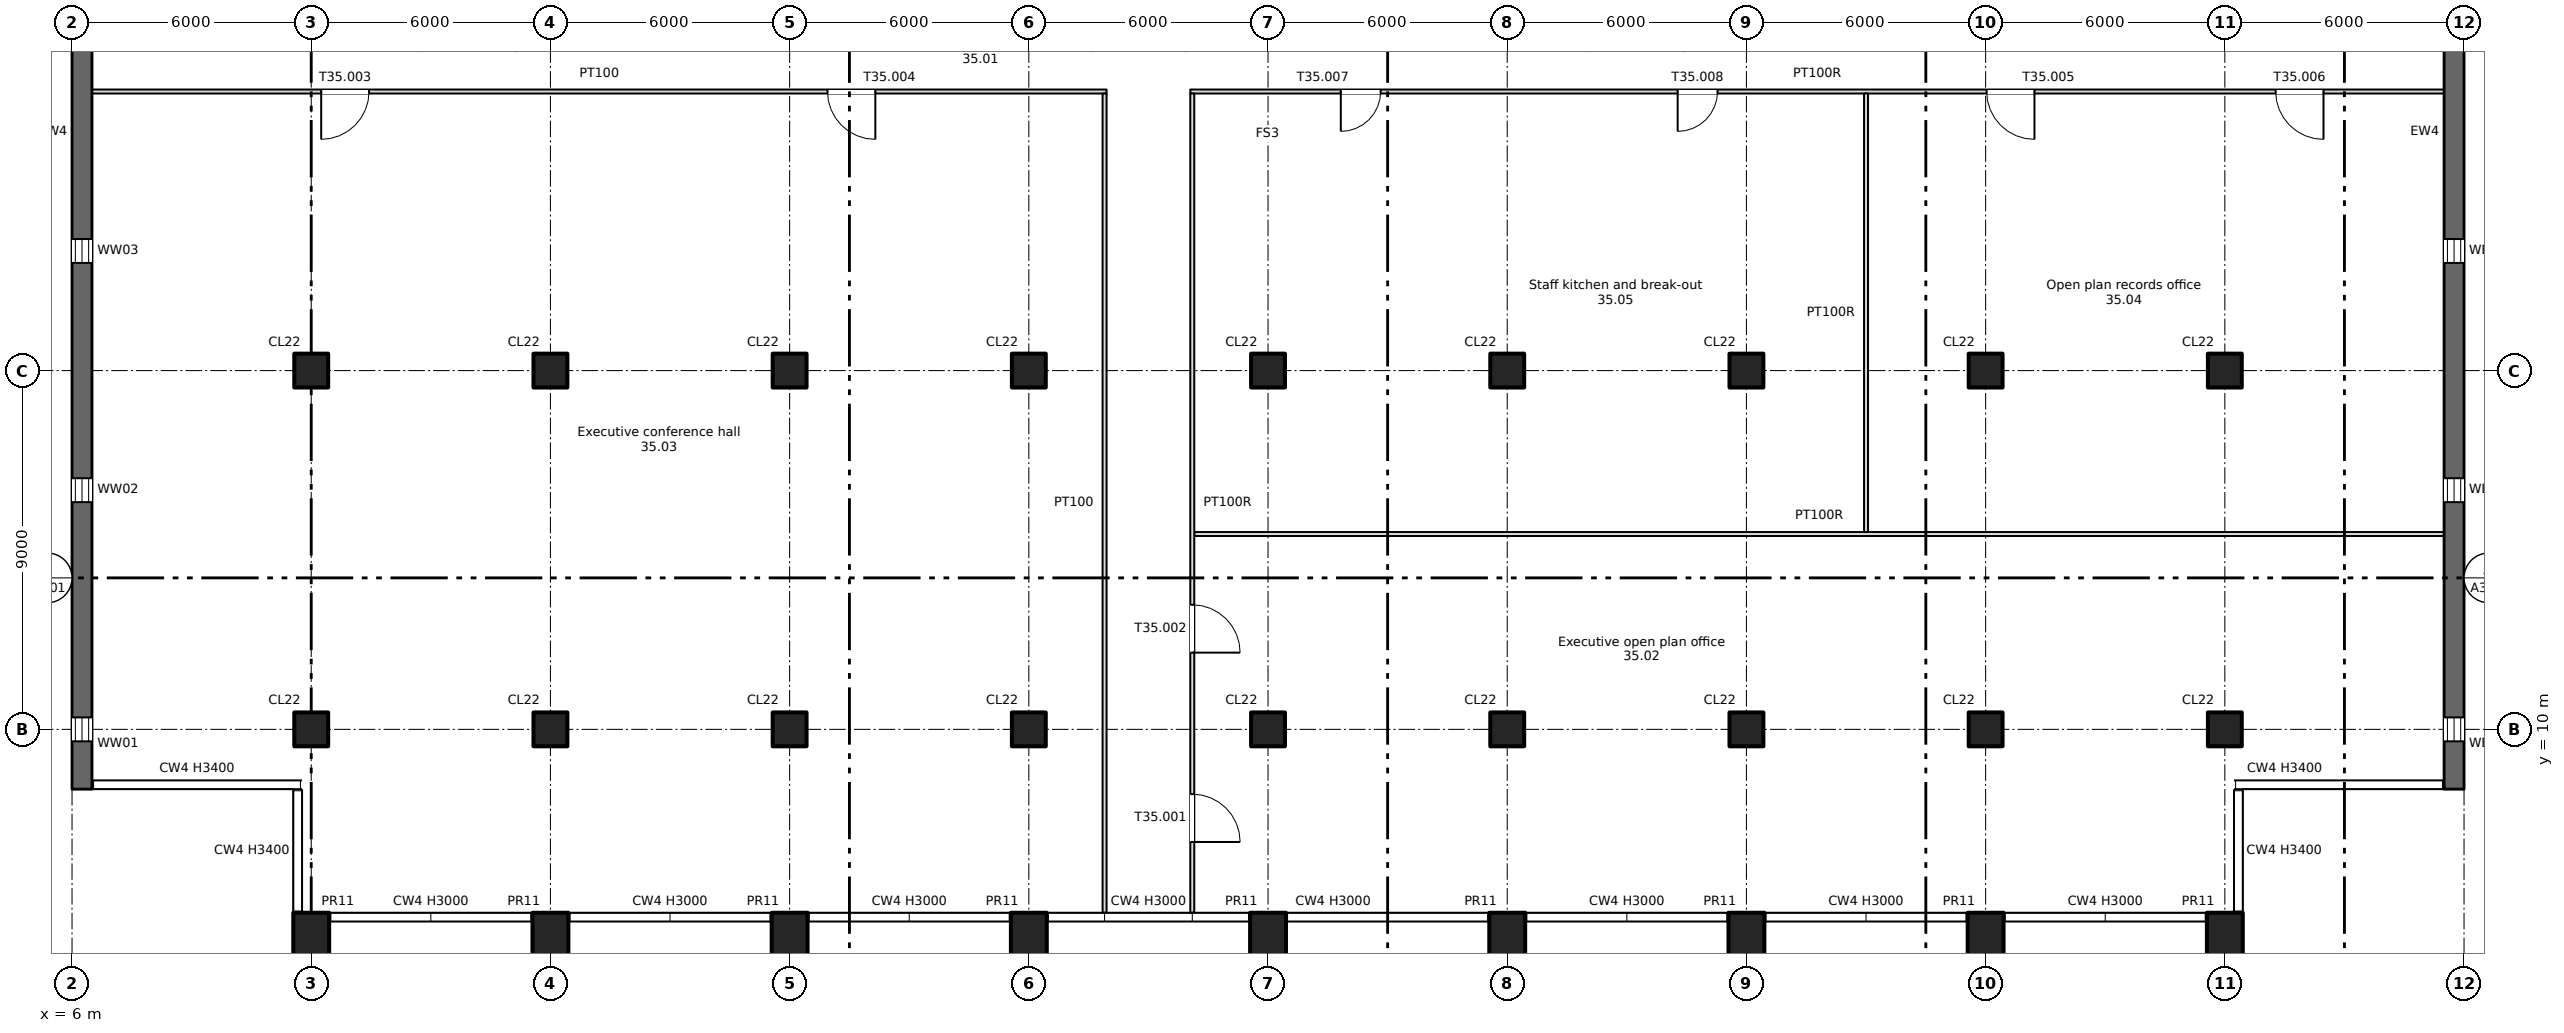
"""IFC4 building model, lengths in metres.
Left out: names, types, materials, properties, quantities, classifications, styles, units other than length and angle.
Written with IfcOpenShell. Run it as: python <this file> out.ifc"""

import sys

from ifc_helpers import new_model, si_unit, direction, frame, frame_2d, origin, origin_2d, place, context, subcontext, project, spatial, rectangle, extrude, element, fill, save


model = new_model("IFC4")
c1 = context("Model", 3, precision=1e-05, world=origin(), true_north=direction((0.0, 1.0)))
c2 = subcontext(c1, "Body", "Model", "MODEL_VIEW")
j1 = project(units=[si_unit("LENGTHUNIT", "METRE"), si_unit("PLANEANGLEUNIT", "RADIAN")], contexts=[c1])
p1 = place(None, origin())
s1 = spatial("IfcSite", under=j1, at=p1, CompositionType="ELEMENT")
p2 = place(p1, origin())
s2 = spatial("IfcBuilding", under=s1, at=p2, CompositionType="ELEMENT")
p3 = place(p2, frame((0.0, 0.0, 246.95)))
s3 = spatial("IfcBuildingStorey", under=s2, at=p3, CompositionType="ELEMENT", Elevation=246.95)
for number, where, z_axis, x_axis in (
    (1, (12.0, 4.7, -0.4), (0.0, 0.0, 1.0), (1.0, 0.0, 0.0)),
    (2, (18.0, 4.7, -0.4), (0.0, 0.0, 1.0), (1.0, 0.0, 0.0)),
    (3, (24.0, 4.7, -0.4), (0.0, 0.0, 1.0), (1.0, 0.0, 0.0)),
    (4, (30.0, 4.7, -0.4), (0.0, 0.0, 1.0), (1.0, 0.0, 0.0)),
    (5, (36.0, 4.7, -0.4), (0.0, 0.0, 1.0), (1.0, 0.0, 0.0)),
    (6, (42.0, 4.7, -0.4), (0.0, 0.0, 1.0), (1.0, 0.0, 0.0)),
    (7, (48.0, 4.7, -0.4), (0.0, 0.0, 1.0), (1.0, 0.0, 0.0)),
    (8, (54.0, 4.7, -0.4), (0.0, 0.0, 1.0), (1.0, 0.0, 0.0)),
    (9, (60.0, 4.7, -0.4), (0.0, 0.0, 1.0), (1.0, 0.0, 0.0)),
):
    element("IfcColumn", number, at=place(p3, frame(where, z_axis=z_axis, x_axis=x_axis)), inside=s3, PredefinedType="COLUMN", context=c2, shape_type="SweptSolid", body=[
        extrude(rectangle(XDim=0.9, YDim=1.4, at=origin_2d()), origin(), (0.0, 0.0, 1.0), 3.8),
    ])
for number, where, z_axis, x_axis in (
    (10, (12.0, 10.0, 0.0), (0.0, 0.0, 1.0), (1.0, 0.0, 0.0)),
    (11, (12.0, 19.0, 0.0), (0.0, 0.0, 1.0), (1.0, 0.0, 0.0)),
    (12, (18.0, 10.0, 0.0), (0.0, 0.0, 1.0), (1.0, 0.0, 0.0)),
    (13, (18.0, 19.0, 0.0), (0.0, 0.0, 1.0), (1.0, 0.0, 0.0)),
    (14, (24.0, 10.0, 0.0), (0.0, 0.0, 1.0), (1.0, 0.0, 0.0)),
    (15, (24.0, 19.0, 0.0), (0.0, 0.0, 1.0), (1.0, 0.0, 0.0)),
    (16, (30.0, 10.0, 0.0), (0.0, 0.0, 1.0), (1.0, 0.0, 0.0)),
    (17, (30.0, 19.0, 0.0), (0.0, 0.0, 1.0), (1.0, 0.0, 0.0)),
    (18, (36.0, 10.0, 0.0), (0.0, 0.0, 1.0), (1.0, 0.0, 0.0)),
    (19, (36.0, 19.0, 0.0), (0.0, 0.0, 1.0), (1.0, 0.0, 0.0)),
    (20, (42.0, 10.0, 0.0), (0.0, 0.0, 1.0), (1.0, 0.0, 0.0)),
    (21, (42.0, 19.0, 0.0), (0.0, 0.0, 1.0), (1.0, 0.0, 0.0)),
    (22, (48.0, 10.0, 0.0), (0.0, 0.0, 1.0), (1.0, 0.0, 0.0)),
    (23, (48.0, 19.0, 0.0), (0.0, 0.0, 1.0), (1.0, 0.0, 0.0)),
    (24, (54.0, 10.0, 0.0), (0.0, 0.0, 1.0), (1.0, 0.0, 0.0)),
    (25, (54.0, 19.0, 0.0), (0.0, 0.0, 1.0), (1.0, 0.0, 0.0)),
    (26, (60.0, 10.0, 0.0), (0.0, 0.0, 1.0), (1.0, 0.0, 0.0)),
    (27, (60.0, 19.0, 0.0), (0.0, 0.0, 1.0), (1.0, 0.0, 0.0)),
):
    element("IfcColumn", number, at=place(p3, frame(where, z_axis=z_axis, x_axis=x_axis)), inside=s3, PredefinedType="COLUMN", context=c2, shape_type="SweptSolid", body=[
        extrude(rectangle(XDim=0.85, YDim=0.85, at=origin_2d()), origin(), (0.0, 0.0, 1.0), 3.4),
    ])
p4 = place(p3, frame((6.25, 8.5, 0.0), z_axis=(0.0, 0.0, 1.0), x_axis=(0.0, 1.0, 0.0)))
e28 = element("IfcWall", 28, at=p4, inside=s3, PredefinedType="SHEAR", context=c2, shape_type="SweptSolid", body=[
    extrude(rectangle(XDim=33.0, YDim=0.5, at=frame_2d((16.5, 0.0))), origin(), (0.0, 0.0, 1.0), 3.4),
])
p5 = place(p4, frame((1.2, 0.0, 0.6)))
e29 = element("IfcOpeningElement", 29, at=p5, cuts=e28, PredefinedType="OPENING", context=c2, shape_type="SweptSolid", body=[
    extrude(rectangle(XDim=0.6, YDim=2.4, at=frame_2d((0.3, 1.2))), frame((0.0, 0.26, 0.0), z_axis=(0.0, -1.0, 0.0), x_axis=(1.0, 0.0, 0.0)), (0.0, 0.0, 1.0), 0.52),
])
p6 = place(p4, frame((7.2, 0.0, 0.6)))
e30 = element("IfcOpeningElement", 30, at=p6, cuts=e28, PredefinedType="OPENING", context=c2, shape_type="SweptSolid", body=[
    extrude(rectangle(XDim=0.6, YDim=2.4, at=frame_2d((0.3, 1.2))), frame((0.0, 0.26, 0.0), z_axis=(0.0, -1.0, 0.0), x_axis=(1.0, 0.0, 0.0)), (0.0, 0.0, 1.0), 0.52),
])
p7 = place(p4, frame((13.2, 0.0, 0.6)))
e31 = element("IfcOpeningElement", 31, at=p7, cuts=e28, PredefinedType="OPENING", context=c2, shape_type="SweptSolid", body=[
    extrude(rectangle(XDim=0.6, YDim=2.4, at=frame_2d((0.3, 1.2))), frame((0.0, 0.26, 0.0), z_axis=(0.0, -1.0, 0.0), x_axis=(1.0, 0.0, 0.0)), (0.0, 0.0, 1.0), 0.52),
])
p8 = place(p3, frame((65.75, 8.5, 0.0), z_axis=(0.0, 0.0, 1.0), x_axis=(0.0, 1.0, 0.0)))
e32 = element("IfcWall", 32, at=p8, inside=s3, PredefinedType="SHEAR", context=c2, shape_type="SweptSolid", body=[
    extrude(rectangle(XDim=33.0, YDim=0.5, at=frame_2d((16.5, 0.0))), origin(), (0.0, 0.0, 1.0), 3.4),
])
p9 = place(p8, frame((1.2, 0.0, 0.6)))
e33 = element("IfcOpeningElement", 33, at=p9, cuts=e32, PredefinedType="OPENING", context=c2, shape_type="SweptSolid", body=[
    extrude(rectangle(XDim=0.6, YDim=2.4, at=frame_2d((0.3, 1.2))), frame((0.0, 0.26, 0.0), z_axis=(0.0, -1.0, 0.0), x_axis=(1.0, 0.0, 0.0)), (0.0, 0.0, 1.0), 0.52),
])
p10 = place(p8, frame((7.2, 0.0, 0.6)))
e34 = element("IfcOpeningElement", 34, at=p10, cuts=e32, PredefinedType="OPENING", context=c2, shape_type="SweptSolid", body=[
    extrude(rectangle(XDim=0.6, YDim=2.4, at=frame_2d((0.3, 1.2))), frame((0.0, 0.26, 0.0), z_axis=(0.0, -1.0, 0.0), x_axis=(1.0, 0.0, 0.0)), (0.0, 0.0, 1.0), 0.52),
])
p11 = place(p8, frame((13.2, 0.0, 0.6)))
e35 = element("IfcOpeningElement", 35, at=p11, cuts=e32, PredefinedType="OPENING", context=c2, shape_type="SweptSolid", body=[
    extrude(rectangle(XDim=0.6, YDim=2.4, at=frame_2d((0.3, 1.2))), frame((0.0, 0.26, 0.0), z_axis=(0.0, -1.0, 0.0), x_axis=(1.0, 0.0, 0.0)), (0.0, 0.0, 1.0), 0.52),
])
p12 = place(p3, frame((34.15, 14.9, 0.0), z_axis=(0.0, 0.0, 1.0), x_axis=(1.0, 0.0, 0.0)))
e36 = element("IfcWall", 36, at=p12, inside=s3, PredefinedType="PARTITIONING", context=c2, shape_type="SweptSolid", body=[
    extrude(rectangle(XDim=31.35, YDim=0.1, at=frame_2d((15.675, 0.0))), origin(), (0.0, 0.0, 1.0), 3.4),
])
p13 = place(p3, frame((6.5, 26.0, 0.0), z_axis=(0.0, 0.0, 1.0), x_axis=(1.0, 0.0, 0.0)))
e37 = element("IfcWall", 37, at=p13, inside=s3, PredefinedType="PARTITIONING", context=c2, shape_type="SweptSolid", body=[
    extrude(rectangle(XDim=25.45, YDim=0.1, at=frame_2d((12.725, 0.0))), origin(), (0.0, 0.0, 1.0), 3.4),
])
p14 = place(p13, frame((5.75, 0.0, 0.0)))
e38 = element("IfcOpeningElement", 38, at=p14, cuts=e37, PredefinedType="OPENING", context=c2, shape_type="SweptSolid", body=[
    extrude(rectangle(XDim=1.2, YDim=2.1, at=frame_2d((0.6, 1.05))), frame((0.0, 0.06, 0.0), z_axis=(0.0, -1.0, 0.0), x_axis=(1.0, 0.0, 0.0)), (0.0, 0.0, 1.0), 0.12),
])
p15 = place(p13, frame((18.45, 0.0, 0.0)))
e39 = element("IfcOpeningElement", 39, at=p15, cuts=e37, PredefinedType="OPENING", context=c2, shape_type="SweptSolid", body=[
    extrude(rectangle(XDim=1.2, YDim=2.1, at=frame_2d((0.6, 1.05))), frame((0.0, 0.06, 0.0), z_axis=(0.0, -1.0, 0.0), x_axis=(1.0, 0.0, 0.0)), (0.0, 0.0, 1.0), 0.12),
])
p16 = place(p3, frame((34.05, 26.0, 0.0), z_axis=(0.0, 0.0, 1.0), x_axis=(1.0, 0.0, 0.0)))
e40 = element("IfcWall", 40, at=p16, inside=s3, PredefinedType="PARTITIONING", context=c2, shape_type="SweptSolid", body=[
    extrude(rectangle(XDim=31.45, YDim=0.1, at=frame_2d((15.725, 0.0))), origin(), (0.0, 0.0, 1.0), 3.4),
])
p17 = place(p16, frame((19.975, 0.0, 0.0)))
e41 = element("IfcOpeningElement", 41, at=p17, cuts=e40, PredefinedType="OPENING", context=c2, shape_type="SweptSolid", body=[
    extrude(rectangle(XDim=1.2, YDim=2.1, at=frame_2d((0.6, 1.05))), frame((0.0, 0.06, 0.0), z_axis=(0.0, -1.0, 0.0), x_axis=(1.0, 0.0, 0.0)), (0.0, 0.0, 1.0), 0.12),
])
p18 = place(p16, frame((27.225, 0.0, 0.0)))
e42 = element("IfcOpeningElement", 42, at=p18, cuts=e40, PredefinedType="OPENING", context=c2, shape_type="SweptSolid", body=[
    extrude(rectangle(XDim=1.2, YDim=2.1, at=frame_2d((0.6, 1.05))), frame((0.0, 0.06, 0.0), z_axis=(0.0, -1.0, 0.0), x_axis=(1.0, 0.0, 0.0)), (0.0, 0.0, 1.0), 0.12),
])
p19 = place(p16, frame((3.775, 0.0, 0.0)))
e43 = element("IfcOpeningElement", 43, at=p19, cuts=e40, PredefinedType="OPENING", context=c2, shape_type="SweptSolid", body=[
    extrude(rectangle(XDim=1.0, YDim=2.1, at=frame_2d((0.5, 1.05))), frame((0.0, 0.06, 0.0), z_axis=(0.0, -1.0, 0.0), x_axis=(1.0, 0.0, 0.0)), (0.0, 0.0, 1.0), 0.12),
])
p20 = place(p16, frame((12.225, 0.0, 0.0)))
e44 = element("IfcOpeningElement", 44, at=p20, cuts=e40, PredefinedType="OPENING", context=c2, shape_type="SweptSolid", body=[
    extrude(rectangle(XDim=1.0, YDim=2.1, at=frame_2d((0.5, 1.05))), frame((0.0, 0.06, 0.0), z_axis=(0.0, -1.0, 0.0), x_axis=(1.0, 0.0, 0.0)), (0.0, 0.0, 1.0), 0.12),
])
p21 = place(p3, frame((31.9, 5.4, 0.0), z_axis=(0.0, 0.0, 1.0), x_axis=(0.0, 1.0, 0.0)))
e45 = element("IfcWall", 45, at=p21, inside=s3, PredefinedType="PARTITIONING", context=c2, shape_type="SweptSolid", body=[
    extrude(rectangle(XDim=20.55, YDim=0.1, at=frame_2d((10.275, 0.0))), origin(), (0.0, 0.0, 1.0), 3.4),
])
p22 = place(p3, frame((34.1, 5.4, 0.0), z_axis=(0.0, 0.0, 1.0), x_axis=(0.0, 1.0, 0.0)))
e46 = element("IfcWall", 46, at=p22, inside=s3, PredefinedType="PARTITIONING", context=c2, shape_type="SweptSolid", body=[
    extrude(rectangle(XDim=20.55, YDim=0.1, at=frame_2d((10.275, 0.0))), origin(), (0.0, 0.0, 1.0), 3.4),
])
p23 = place(p22, frame((1.775, 0.0, 0.0)))
e47 = element("IfcOpeningElement", 47, at=p23, cuts=e46, PredefinedType="OPENING", context=c2, shape_type="SweptSolid", body=[
    extrude(rectangle(XDim=1.2, YDim=2.1, at=frame_2d((0.6, 1.05))), frame((0.0, 0.06, 0.0), z_axis=(0.0, -1.0, 0.0), x_axis=(1.0, 0.0, 0.0)), (0.0, 0.0, 1.0), 0.12),
])
p24 = place(p22, frame((6.525, 0.0, 0.0)))
e48 = element("IfcOpeningElement", 48, at=p24, cuts=e46, PredefinedType="OPENING", context=c2, shape_type="SweptSolid", body=[
    extrude(rectangle(XDim=1.2, YDim=2.1, at=frame_2d((0.6, 1.05))), frame((0.0, 0.06, 0.0), z_axis=(0.0, -1.0, 0.0), x_axis=(1.0, 0.0, 0.0)), (0.0, 0.0, 1.0), 0.12),
])
p25 = place(p3, frame((51.0, 14.95, 0.0), z_axis=(0.0, 0.0, 1.0), x_axis=(0.0, 1.0, 0.0)))
e49 = element("IfcWall", 49, at=p25, inside=s3, PredefinedType="PARTITIONING", context=c2, shape_type="SweptSolid", body=[
    extrude(rectangle(XDim=11.0, YDim=0.1, at=frame_2d((5.5, 0.0))), origin(), (0.0, 0.0, 1.0), 3.4),
])
p26 = place(p5, origin())
e50 = element("IfcWindow", 50, at=p26, inside=s3, PartitioningType="SINGLE_PANEL", PredefinedType="WINDOW", context=c2, shape_type="SweptSolid", body=[
    extrude(rectangle(XDim=0.6, YDim=2.4, at=frame_2d((0.3, 1.2))), frame((0.0, 0.03, 0.0), z_axis=(0.0, -1.0, 0.0), x_axis=(1.0, 0.0, 0.0)), (0.0, 0.0, 1.0), 0.06),
])
fill(e29, e50)
p27 = place(p6, origin())
e51 = element("IfcWindow", 51, at=p27, inside=s3, PartitioningType="SINGLE_PANEL", PredefinedType="WINDOW", context=c2, shape_type="SweptSolid", body=[
    extrude(rectangle(XDim=0.6, YDim=2.4, at=frame_2d((0.3, 1.2))), frame((0.0, 0.03, 0.0), z_axis=(0.0, -1.0, 0.0), x_axis=(1.0, 0.0, 0.0)), (0.0, 0.0, 1.0), 0.06),
])
fill(e30, e51)
p28 = place(p7, origin())
e52 = element("IfcWindow", 52, at=p28, inside=s3, PartitioningType="SINGLE_PANEL", PredefinedType="WINDOW", context=c2, shape_type="SweptSolid", body=[
    extrude(rectangle(XDim=0.6, YDim=2.4, at=frame_2d((0.3, 1.2))), frame((0.0, 0.03, 0.0), z_axis=(0.0, -1.0, 0.0), x_axis=(1.0, 0.0, 0.0)), (0.0, 0.0, 1.0), 0.06),
])
fill(e31, e52)
p29 = place(p9, origin())
e53 = element("IfcWindow", 53, at=p29, inside=s3, PartitioningType="SINGLE_PANEL", PredefinedType="WINDOW", context=c2, shape_type="SweptSolid", body=[
    extrude(rectangle(XDim=0.6, YDim=2.4, at=frame_2d((0.3, 1.2))), frame((0.0, 0.03, 0.0), z_axis=(0.0, -1.0, 0.0), x_axis=(1.0, 0.0, 0.0)), (0.0, 0.0, 1.0), 0.06),
])
fill(e33, e53)
p30 = place(p10, origin())
e54 = element("IfcWindow", 54, at=p30, inside=s3, PartitioningType="SINGLE_PANEL", PredefinedType="WINDOW", context=c2, shape_type="SweptSolid", body=[
    extrude(rectangle(XDim=0.6, YDim=2.4, at=frame_2d((0.3, 1.2))), frame((0.0, 0.03, 0.0), z_axis=(0.0, -1.0, 0.0), x_axis=(1.0, 0.0, 0.0)), (0.0, 0.0, 1.0), 0.06),
])
fill(e34, e54)
p31 = place(p11, origin())
e55 = element("IfcWindow", 55, at=p31, inside=s3, PartitioningType="SINGLE_PANEL", PredefinedType="WINDOW", context=c2, shape_type="SweptSolid", body=[
    extrude(rectangle(XDim=0.6, YDim=2.4, at=frame_2d((0.3, 1.2))), frame((0.0, 0.03, 0.0), z_axis=(0.0, -1.0, 0.0), x_axis=(1.0, 0.0, 0.0)), (0.0, 0.0, 1.0), 0.06),
])
fill(e35, e55)
p32 = place(p23, origin())
e56 = element("IfcDoor", 56, at=p32, inside=s3, OperationType="SINGLE_SWING_LEFT", PredefinedType="DOOR", context=c2, shape_type="SweptSolid", body=[
    extrude(rectangle(XDim=1.2, YDim=2.1, at=frame_2d((0.6, 1.05))), frame((0.0, 0.025, 0.0), z_axis=(0.0, -1.0, 0.0), x_axis=(1.0, 0.0, 0.0)), (0.0, 0.0, 1.0), 0.05),
])
fill(e47, e56)
p33 = place(p24, origin())
e57 = element("IfcDoor", 57, at=p33, inside=s3, OperationType="SINGLE_SWING_LEFT", PredefinedType="DOOR", context=c2, shape_type="SweptSolid", body=[
    extrude(rectangle(XDim=1.2, YDim=2.1, at=frame_2d((0.6, 1.05))), frame((0.0, 0.025, 0.0), z_axis=(0.0, -1.0, 0.0), x_axis=(1.0, 0.0, 0.0)), (0.0, 0.0, 1.0), 0.05),
])
fill(e48, e57)
p34 = place(p14, origin())
e58 = element("IfcDoor", 58, at=p34, inside=s3, OperationType="SINGLE_SWING_LEFT", PredefinedType="DOOR", context=c2, shape_type="SweptSolid", body=[
    extrude(rectangle(XDim=1.2, YDim=2.1, at=frame_2d((0.6, 1.05))), frame((0.0, 0.025, 0.0), z_axis=(0.0, -1.0, 0.0), x_axis=(1.0, 0.0, 0.0)), (0.0, 0.0, 1.0), 0.05),
])
fill(e38, e58)
p35 = place(p15, origin())
e59 = element("IfcDoor", 59, at=p35, inside=s3, OperationType="SINGLE_SWING_RIGHT", PredefinedType="DOOR", context=c2, shape_type="SweptSolid", body=[
    extrude(rectangle(XDim=1.2, YDim=2.1, at=frame_2d((0.6, 1.05))), frame((0.0, 0.025, 0.0), z_axis=(0.0, -1.0, 0.0), x_axis=(1.0, 0.0, 0.0)), (0.0, 0.0, 1.0), 0.05),
])
fill(e39, e59)
p36 = place(p17, origin())
e60 = element("IfcDoor", 60, at=p36, inside=s3, OperationType="SINGLE_SWING_RIGHT", PredefinedType="DOOR", context=c2, shape_type="SweptSolid", body=[
    extrude(rectangle(XDim=1.2, YDim=2.1, at=frame_2d((0.6, 1.05))), frame((0.0, 0.025, 0.0), z_axis=(0.0, -1.0, 0.0), x_axis=(1.0, 0.0, 0.0)), (0.0, 0.0, 1.0), 0.05),
])
fill(e41, e60)
p37 = place(p18, origin())
e61 = element("IfcDoor", 61, at=p37, inside=s3, OperationType="SINGLE_SWING_RIGHT", PredefinedType="DOOR", context=c2, shape_type="SweptSolid", body=[
    extrude(rectangle(XDim=1.2, YDim=2.1, at=frame_2d((0.6, 1.05))), frame((0.0, 0.025, 0.0), z_axis=(0.0, -1.0, 0.0), x_axis=(1.0, 0.0, 0.0)), (0.0, 0.0, 1.0), 0.05),
])
fill(e42, e61)
p38 = place(p19, origin())
e62 = element("IfcDoor", 62, at=p38, inside=s3, OperationType="SINGLE_SWING_LEFT", PredefinedType="DOOR", context=c2, shape_type="SweptSolid", body=[
    extrude(rectangle(XDim=1.0, YDim=2.1, at=frame_2d((0.5, 1.05))), frame((0.0, 0.025, 0.0), z_axis=(0.0, -1.0, 0.0), x_axis=(1.0, 0.0, 0.0)), (0.0, 0.0, 1.0), 0.05),
])
fill(e43, e62)
p39 = place(p20, origin())
e63 = element("IfcDoor", 63, at=p39, inside=s3, OperationType="SINGLE_SWING_LEFT", PredefinedType="DOOR", context=c2, shape_type="SweptSolid", body=[
    extrude(rectangle(XDim=1.0, YDim=2.1, at=frame_2d((0.5, 1.05))), frame((0.0, 0.025, 0.0), z_axis=(0.0, -1.0, 0.0), x_axis=(1.0, 0.0, 0.0)), (0.0, 0.0, 1.0), 0.05),
])
fill(e44, e63)
save(model, sys.argv[1])
